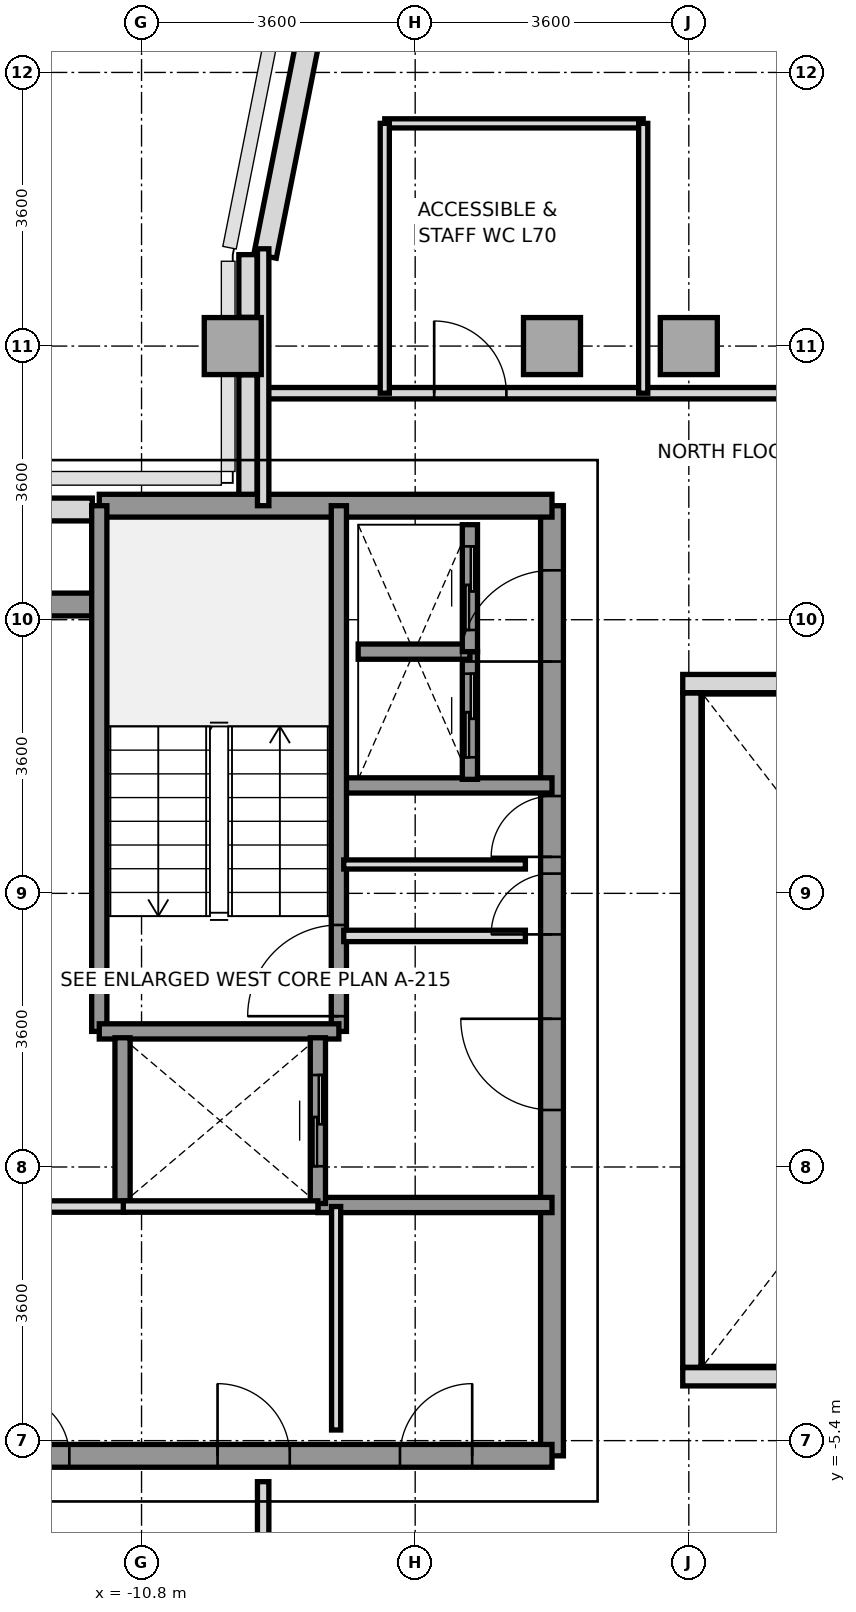
"""IFC4 building model, lengths in metres.
Left out: names, types, materials, properties, quantities, classifications, styles, units other than length and angle.
Written with IfcOpenShell. Run it as: python <this file> out.ifc"""

import sys

from ifc_helpers import new_model, si_unit, direction, frame, frame_2d, origin, origin_2d, place, context, subcontext, project, spatial, rectangle, extrude, source, transform, mapped, element, fill, save


model = new_model("IFC4")
c1 = context("Model", 3, precision=1e-05, world=origin(), true_north=direction((0.0, 1.0)))
c2 = subcontext(c1, "Body", "Model", "MODEL_VIEW")
j1 = project(units=[si_unit("LENGTHUNIT", "METRE"), si_unit("PLANEANGLEUNIT", "RADIAN")], contexts=[c1])
p1 = place(None, origin())
s1 = spatial("IfcSite", under=j1, at=p1, CompositionType="ELEMENT")
p2 = place(p1, origin())
s2 = spatial("IfcBuilding", under=s1, at=p2, CompositionType="ELEMENT")
p3 = place(p2, frame((0.0, 0.0, 252.4)))
s3 = spatial("IfcBuildingStorey", under=s2, at=p3, CompositionType="ELEMENT", Elevation=252.4)
m1 = source(origin(), c2, "Body", "SweptSolid", [
    extrude(rectangle(XDim=0.75, YDim=0.75, at=origin_2d()), origin(), (0.0, 0.0, 1.0), 3.01),
])
for number, where, z_axis, x_axis in (
    (1, (-9.6, 9.0, 0.0), (0.0, 0.0, 1.0), (1.0, 0.0, 0.0)),
    (2, (-5.4, 9.0, 0.0), (0.0, 0.0, 1.0), (1.0, 0.0, 0.0)),
    (3, (-3.6, 9.0, 0.0), (0.0, 0.0, 1.0), (1.0, 0.0, 0.0)),
):
    element("IfcColumn", number, at=place(p3, frame(where, z_axis=z_axis, x_axis=x_axis)), inside=s3, PredefinedType="COLUMN", context=c2, shape_type="MappedRepresentation", body=[
        mapped(m1, transform((0.0, 0.0, 0.0), x_axis=(1.0, 0.0, 0.0), y_axis=(0.0, 1.0, 0.0), z_axis=(0.0, 0.0, 1.0), scale=1.0)),
    ])
p4 = place(p3, frame((-13.6, 6.85, 0.0), z_axis=(0.0, 0.0, 1.0), x_axis=(1.0, 0.0, 0.0)))
e4 = element("IfcWall", 4, at=p4, inside=s3, PredefinedType="SOLIDWALL", context=c2, shape_type="SweptSolid", body=[
    extrude(rectangle(XDim=2.152, YDim=0.3, at=frame_2d((1.076, 0.0))), origin(), (0.0, 0.0, 1.0), 3.01),
])
p5 = place(p3, frame((-8.471, 13.725, 0.0), z_axis=(0.0, 0.0, 1.0), x_axis=(-0.195114232679, -0.980780523974, 0.0)))
e5 = element("IfcWall", 5, at=p5, inside=s3, PredefinedType="SOLIDWALL", context=c2, shape_type="SweptSolid", body=[
    extrude(rectangle(XDim=3.609, YDim=0.3, at=frame_2d((1.804, 0.0))), origin(), (0.0, 0.0, 1.0), 3.01),
])
p6 = place(p3, frame((-9.4, 6.953, 0.0), z_axis=(0.0, 0.0, 1.0), x_axis=(0.0, 1.0, 0.0)))
e6 = element("IfcWall", 6, at=p6, inside=s3, PredefinedType="PARAPET", context=c2, shape_type="SweptSolid", body=[
    extrude(rectangle(XDim=1.669, YDim=0.24, at=frame_2d((0.834, 0.0))), origin(), (0.0, 0.0, 1.0), 1.15),
])
p7 = place(p3, frame((-9.4, 9.378, 0.0), z_axis=(0.0, 0.0, 1.0), x_axis=(0.0, 1.0, 0.0)))
e7 = element("IfcWall", 7, at=p7, inside=s3, PredefinedType="PARAPET", context=c2, shape_type="SweptSolid", body=[
    extrude(rectangle(XDim=0.825, YDim=0.24, at=frame_2d((0.413, 0.0))), origin(), (0.0, 0.0, 1.0), 1.15),
])
p8 = place(p3, frame((-5.4, -5.6, 0.0), z_axis=(0.0, 0.0, 1.0), x_axis=(0.0, 1.0, 0.0)))
e8 = element("IfcWall", 8, at=p8, inside=s3, PredefinedType="SHEAR", context=c2, shape_type="SweptSolid", body=[
    extrude(rectangle(XDim=12.5, YDim=0.3, at=frame_2d((6.25, 0.0))), origin(), (0.0, 0.0, 1.0), 3.01),
])
p9 = place(p8, frame((4.55, 0.0, 0.0)))
e9 = element("IfcOpeningElement", 9, at=p9, cuts=e8, PredefinedType="OPENING", context=c2, shape_type="SweptSolid", body=[
    extrude(rectangle(XDim=1.2, YDim=2.2, at=frame_2d((0.6, 1.1))), frame((0.0, 0.16, 0.0), z_axis=(0.0, -1.0, 0.0), x_axis=(1.0, 0.0, 0.0)), (0.0, 0.0, 1.0), 0.32),
])
p10 = place(p8, frame((10.45, 0.0, 0.0)))
e10 = element("IfcOpeningElement", 10, at=p10, cuts=e8, PredefinedType="OPENING", context=c2, shape_type="SweptSolid", body=[
    extrude(rectangle(XDim=1.2, YDim=2.2, at=frame_2d((0.6, 1.1))), frame((0.0, 0.16, 0.0), z_axis=(0.0, -1.0, 0.0), x_axis=(1.0, 0.0, 0.0)), (0.0, 0.0, 1.0), 0.32),
])
p11 = place(p8, frame((6.86, 0.0, 0.0)))
e11 = element("IfcOpeningElement", 11, at=p11, cuts=e8, PredefinedType="OPENING", context=c2, shape_type="SweptSolid", body=[
    extrude(rectangle(XDim=0.8, YDim=2.1, at=frame_2d((0.4, 1.05))), frame((0.0, 0.16, 0.0), z_axis=(0.0, -1.0, 0.0), x_axis=(1.0, 0.0, 0.0)), (0.0, 0.0, 1.0), 0.32),
])
p12 = place(p8, frame((7.88, 0.0, 0.0)))
e12 = element("IfcOpeningElement", 12, at=p12, cuts=e8, PredefinedType="OPENING", context=c2, shape_type="SweptSolid", body=[
    extrude(rectangle(XDim=0.8, YDim=2.1, at=frame_2d((0.4, 1.05))), frame((0.0, 0.16, 0.0), z_axis=(0.0, -1.0, 0.0), x_axis=(1.0, 0.0, 0.0)), (0.0, 0.0, 1.0), 0.32),
])
p13 = place(p3, frame((-11.356, 6.9, 0.0), z_axis=(0.0, 0.0, 1.0), x_axis=(1.0, 0.0, 0.0)))
e13 = element("IfcWall", 13, at=p13, inside=s3, PredefinedType="SHEAR", context=c2, shape_type="SweptSolid", body=[
    extrude(rectangle(XDim=5.956, YDim=0.3, at=frame_2d((2.978, 0.0))), origin(), (0.0, 0.0, 1.0), 3.01),
])
p14 = place(p3, frame((-13.2, 5.6, 0.0), z_axis=(0.0, 0.0, 1.0), x_axis=(1.0, 0.0, 0.0)))
e14 = element("IfcWall", 14, at=p14, inside=s3, PredefinedType="SHEAR", context=c2, shape_type="SweptSolid", body=[
    extrude(rectangle(XDim=1.844, YDim=0.3, at=frame_2d((0.922, 0.0))), origin(), (0.0, 0.0, 1.0), 3.01),
])
p15 = place(p3, frame((-13.2, -5.6, 0.0), z_axis=(0.0, 0.0, 1.0), x_axis=(1.0, 0.0, 0.0)))
e15 = element("IfcWall", 15, at=p15, inside=s3, PredefinedType="SHEAR", context=c2, shape_type="SweptSolid", body=[
    extrude(rectangle(XDim=7.8, YDim=0.3, at=frame_2d((3.9, 0.0))), origin(), (0.0, 0.0, 1.0), 3.01),
])
p16 = place(p15, frame((0.65, 0.0, 0.0)))
e16 = element("IfcOpeningElement", 16, at=p16, cuts=e15, PredefinedType="OPENING", context=c2, shape_type="SweptSolid", body=[
    extrude(rectangle(XDim=0.8, YDim=2.1, at=frame_2d((0.4, 1.05))), frame((0.0, 0.16, 0.0), z_axis=(0.0, -1.0, 0.0), x_axis=(1.0, 0.0, 0.0)), (0.0, 0.0, 1.0), 0.32),
])
p17 = place(p15, frame((3.4, 0.0, 0.0)))
e17 = element("IfcOpeningElement", 17, at=p17, cuts=e15, PredefinedType="OPENING", context=c2, shape_type="SweptSolid", body=[
    extrude(rectangle(XDim=0.95, YDim=2.15, at=frame_2d((0.475, 1.075))), frame((0.0, 0.16, 0.0), z_axis=(0.0, -1.0, 0.0), x_axis=(1.0, 0.0, 0.0)), (0.0, 0.0, 1.0), 0.32),
])
p18 = place(p15, frame((5.8, 0.0, 0.0)))
e18 = element("IfcOpeningElement", 18, at=p18, cuts=e15, PredefinedType="OPENING", context=c2, shape_type="SweptSolid", body=[
    extrude(rectangle(XDim=0.95, YDim=2.15, at=frame_2d((0.475, 1.075))), frame((0.0, 0.16, 0.0), z_axis=(0.0, -1.0, 0.0), x_axis=(1.0, 0.0, 0.0)), (0.0, 0.0, 1.0), 0.32),
])
p19 = place(p3, frame((-8.18, 3.22, 0.0), z_axis=(0.0, 0.0, 1.0), x_axis=(1.0, 0.0, 0.0)))
e19 = element("IfcWall", 19, at=p19, inside=s3, PredefinedType="SOLIDWALL", context=c2, shape_type="SweptSolid", body=[
    extrude(rectangle(XDim=2.78, YDim=0.2, at=frame_2d((1.39, 0.0))), origin(), (0.0, 0.0, 1.0), 3.01),
])
p20 = place(p3, frame((-8.48, -2.3, 0.0), z_axis=(0.0, 0.0, 1.0), x_axis=(1.0, 0.0, 0.0)))
e20 = element("IfcWall", 20, at=p20, inside=s3, PredefinedType="SOLIDWALL", context=c2, shape_type="SweptSolid", body=[
    extrude(rectangle(XDim=3.08, YDim=0.2, at=frame_2d((1.54, 0.0))), origin(), (0.0, 0.0, 1.0), 3.01),
])
p21 = place(p3, frame((-8.204, -0.016, 0.0), z_axis=(0.0, 0.0, 1.0), x_axis=(0.0, 1.0, 0.0)))
e21 = element("IfcWall", 21, at=p21, inside=s3, PredefinedType="SOLIDWALL", context=c2, shape_type="SweptSolid", body=[
    extrude(rectangle(XDim=6.916, YDim=0.2, at=frame_2d((3.458, 0.0))), origin(), (0.0, 0.0, 1.0), 3.01),
])
p22 = place(p21, frame((0.2, 0.0, 0.0)))
e22 = element("IfcOpeningElement", 22, at=p22, cuts=e21, PredefinedType="OPENING", context=c2, shape_type="SweptSolid", body=[
    extrude(rectangle(XDim=1.2, YDim=2.2, at=frame_2d((0.6, 1.1))), frame((0.0, 0.11, 0.0), z_axis=(0.0, -1.0, 0.0), x_axis=(1.0, 0.0, 0.0)), (0.0, 0.0, 1.0), 0.22),
])
p23 = place(p3, frame((-11.356, -0.016, 0.0), z_axis=(0.0, 0.0, 1.0), x_axis=(0.0, 1.0, 0.0)))
e23 = element("IfcWall", 23, at=p23, inside=s3, PredefinedType="SOLIDWALL", context=c2, shape_type="SweptSolid", body=[
    extrude(rectangle(XDim=6.916, YDim=0.2, at=frame_2d((3.458, 0.0))), origin(), (0.0, 0.0, 1.0), 3.01),
])
p24 = place(p3, frame((-11.356, -0.016, 0.0), z_axis=(0.0, 0.0, 1.0), x_axis=(1.0, 0.0, 0.0)))
e24 = element("IfcWall", 24, at=p24, inside=s3, PredefinedType="SOLIDWALL", context=c2, shape_type="SweptSolid", body=[
    extrude(rectangle(XDim=3.152, YDim=0.2, at=frame_2d((1.576, 0.0))), origin(), (0.0, 0.0, 1.0), 3.01),
])
p25 = place(p3, frame((-11.05, -2.28, 0.0), z_axis=(0.0, 0.0, 1.0), x_axis=(0.0, 1.0, 0.0)))
e25 = element("IfcWall", 25, at=p25, inside=s3, PredefinedType="SOLIDWALL", context=c2, shape_type="SweptSolid", body=[
    extrude(rectangle(XDim=2.18, YDim=0.2, at=frame_2d((1.09, 0.0))), origin(), (0.0, 0.0, 1.0), 3.01),
])
p26 = place(p3, frame((-8.48, -2.28, 0.0), z_axis=(0.0, 0.0, 1.0), x_axis=(0.0, 1.0, 0.0)))
e26 = element("IfcWall", 26, at=p26, inside=s3, PredefinedType="SOLIDWALL", context=c2, shape_type="SweptSolid", body=[
    extrude(rectangle(XDim=2.18, YDim=0.2, at=frame_2d((1.09, 0.0))), origin(), (0.0, 0.0, 1.0), 3.01),
])
p27 = place(p26, frame((0.49, 0.0, 0.0)))
e27 = element("IfcOpeningElement", 27, at=p27, cuts=e26, PredefinedType="OPENING", context=c2, shape_type="SweptSolid", body=[
    extrude(rectangle(XDim=1.2, YDim=2.2, at=frame_2d((0.6, 1.1))), frame((0.0, 0.11, 0.0), z_axis=(0.0, -1.0, 0.0), x_axis=(1.0, 0.0, 0.0)), (0.0, 0.0, 1.0), 0.22),
])
p28 = place(p3, frame((-6.48, 3.3, 0.0), z_axis=(0.0, 0.0, 1.0), x_axis=(0.0, 1.0, 0.0)))
e28 = element("IfcWall", 28, at=p28, inside=s3, PredefinedType="SOLIDWALL", context=c2, shape_type="SweptSolid", body=[
    extrude(rectangle(XDim=1.68, YDim=0.2, at=frame_2d((0.84, 0.0))), origin(), (0.0, 0.0, 1.0), 3.01),
])
p29 = place(p28, frame((0.29, 0.0, 0.0)))
e29 = element("IfcOpeningElement", 29, at=p29, cuts=e28, PredefinedType="OPENING", context=c2, shape_type="SweptSolid", body=[
    extrude(rectangle(XDim=1.1, YDim=2.2, at=frame_2d((0.55, 1.1))), frame((0.0, 0.11, 0.0), z_axis=(0.0, -1.0, 0.0), x_axis=(1.0, 0.0, 0.0)), (0.0, 0.0, 1.0), 0.22),
])
p30 = place(p3, frame((-7.95, 4.98, 0.0), z_axis=(0.0, 0.0, 1.0), x_axis=(1.0, 0.0, 0.0)))
e30 = element("IfcWall", 30, at=p30, inside=s3, PredefinedType="SOLIDWALL", context=c2, shape_type="SweptSolid", body=[
    extrude(rectangle(XDim=1.47, YDim=0.2, at=frame_2d((0.735, 0.0))), origin(), (0.0, 0.0, 1.0), 3.01),
])
p31 = place(p3, frame((-6.48, 4.98, 0.0), z_axis=(0.0, 0.0, 1.0), x_axis=(0.0, 1.0, 0.0)))
e31 = element("IfcWall", 31, at=p31, inside=s3, PredefinedType="SOLIDWALL", context=c2, shape_type="SweptSolid", body=[
    extrude(rectangle(XDim=1.67, YDim=0.2, at=frame_2d((0.835, 0.0))), origin(), (0.0, 0.0, 1.0), 3.01),
])
p32 = place(p31, frame((0.285, 0.0, 0.0)))
e32 = element("IfcOpeningElement", 32, at=p32, cuts=e31, PredefinedType="OPENING", context=c2, shape_type="SweptSolid", body=[
    extrude(rectangle(XDim=1.1, YDim=2.2, at=frame_2d((0.55, 1.1))), frame((0.0, 0.11, 0.0), z_axis=(0.0, -1.0, 0.0), x_axis=(1.0, 0.0, 0.0)), (0.0, 0.0, 1.0), 0.22),
])
p33 = place(p3, frame((-8.14, 1.24, 0.0), z_axis=(0.0, 0.0, 1.0), x_axis=(1.0, 0.0, 0.0)))
e33 = element("IfcWall", 33, at=p33, inside=s3, PredefinedType="PARTITIONING", context=c2, shape_type="SweptSolid", body=[
    extrude(rectangle(XDim=2.39, YDim=0.15, at=frame_2d((1.195, 0.0))), origin(), (0.0, 0.0, 1.0), 3.01),
])
p34 = place(p3, frame((-8.14, 2.18, 0.0), z_axis=(0.0, 0.0, 1.0), x_axis=(1.0, 0.0, 0.0)))
e34 = element("IfcWall", 34, at=p34, inside=s3, PredefinedType="PARTITIONING", context=c2, shape_type="SweptSolid", body=[
    extrude(rectangle(XDim=2.39, YDim=0.12, at=frame_2d((1.195, 0.0))), origin(), (0.0, 0.0, 1.0), 3.01),
])
p35 = place(p3, frame((-13.2, -2.32, 0.0), z_axis=(0.0, 0.0, 1.0), x_axis=(1.0, 0.0, 0.0)))
e35 = element("IfcWall", 35, at=p35, inside=s3, PredefinedType="PARTITIONING", context=c2, shape_type="SweptSolid", body=[
    extrude(rectangle(XDim=2.18, YDim=0.15, at=frame_2d((1.09, 0.0))), origin(), (0.0, 0.0, 1.0), 3.01),
])
p36 = place(p3, frame((-8.24, -5.26, 0.0), z_axis=(0.0, 0.0, 1.0), x_axis=(0.0, 1.0, 0.0)))
e36 = element("IfcWall", 36, at=p36, inside=s3, PredefinedType="PARTITIONING", context=c2, shape_type="SweptSolid", body=[
    extrude(rectangle(XDim=2.94, YDim=0.12, at=frame_2d((1.47, 0.0))), origin(), (0.0, 0.0, 1.0), 3.01),
])
p37 = place(p3, frame((-11.04, -2.32, 0.0), z_axis=(0.0, 0.0, 1.0), x_axis=(1.0, 0.0, 0.0)))
e37 = element("IfcWall", 37, at=p37, inside=s3, PredefinedType="PARTITIONING", context=c2, shape_type="SweptSolid", body=[
    extrude(rectangle(XDim=2.56, YDim=0.15, at=frame_2d((1.28, 0.0))), origin(), (0.0, 0.0, 1.0), 3.01),
])
p38 = place(p3, frame((-9.2, 8.38, 0.0), z_axis=(0.0, 0.0, 1.0), x_axis=(1.0, 0.0, 0.0)))
e38 = element("IfcWall", 38, at=p38, inside=s3, PredefinedType="PARTITIONING", context=c2, shape_type="SweptSolid", body=[
    extrude(rectangle(XDim=18.4, YDim=0.15, at=frame_2d((9.2, 0.0))), origin(), (0.0, 0.0, 1.0), 2.57),
])
p39 = place(p38, frame((2.25, 0.0, 0.0)))
e39 = element("IfcOpeningElement", 39, at=p39, cuts=e38, PredefinedType="OPENING", context=c2, shape_type="SweptSolid", body=[
    extrude(rectangle(XDim=0.95, YDim=2.15, at=frame_2d((0.475, 1.075))), frame((0.0, 0.085, 0.0), z_axis=(0.0, -1.0, 0.0), x_axis=(1.0, 0.0, 0.0)), (0.0, 0.0, 1.0), 0.17),
])
p40 = place(p38, frame((15.15, 0.0, 0.0)))
e40 = element("IfcOpeningElement", 40, at=p40, cuts=e38, PredefinedType="OPENING", context=c2, shape_type="SweptSolid", body=[
    extrude(rectangle(XDim=1.1, YDim=2.2, at=frame_2d((0.55, 1.1))), frame((0.0, 0.085, 0.0), z_axis=(0.0, -1.0, 0.0), x_axis=(1.0, 0.0, 0.0)), (0.0, 0.0, 1.0), 0.17),
])
p41 = place(p3, frame((-9.2, 6.9, 0.0), z_axis=(0.0, 0.0, 1.0), x_axis=(0.0, 1.0, 0.0)))
e41 = element("IfcWall", 41, at=p41, inside=s3, PredefinedType="PARTITIONING", context=c2, shape_type="SweptSolid", body=[
    extrude(rectangle(XDim=3.38, YDim=0.15, at=frame_2d((1.69, 0.0))), origin(), (0.0, 0.0, 1.0), 2.61),
])
p42 = place(p3, frame((-7.6, 11.93, 0.0), z_axis=(0.0, 0.0, 1.0), x_axis=(1.0, 0.0, 0.0)))
e42 = element("IfcWall", 42, at=p42, inside=s3, PredefinedType="PARTITIONING", context=c2, shape_type="SweptSolid", body=[
    extrude(rectangle(XDim=3.4, YDim=0.12, at=frame_2d((1.7, 0.0))), origin(), (0.0, 0.0, 1.0), 3.01),
])
for number, where, z_axis, x_axis in (
    (43, (-7.6, 8.38, 0.0), (0.0, 0.0, 1.0), (0.0, 1.0, 0.0)),
    (44, (-4.2, 8.38, 0.0), (0.0, 0.0, 1.0), (0.0, 1.0, 0.0)),
):
    element("IfcWall", number, at=place(p3, frame(where, z_axis=z_axis, x_axis=x_axis)), inside=s3, PredefinedType="PARTITIONING", context=c2, shape_type="SweptSolid", body=[
        extrude(rectangle(XDim=3.55, YDim=0.12, at=frame_2d((1.775, 0.0))), origin(), (0.0, 0.0, 1.0), 2.61),
    ])
p43 = place(p3, frame((-9.2, -10.28, 0.0), z_axis=(0.0, 0.0, 1.0), x_axis=(0.0, 1.0, 0.0)))
e45 = element("IfcWall", 45, at=p43, inside=s3, PredefinedType="PARTITIONING", context=c2, shape_type="SweptSolid", body=[
    extrude(rectangle(XDim=4.34, YDim=0.15, at=frame_2d((2.17, 0.0))), origin(), (0.0, 0.0, 1.0), 2.61),
])
for number, where, z_axis, x_axis in (
    (46, (-3.68, -4.56, 0.0), (0.0, 0.0, 1.0), (1.0, 0.0, 0.0)),
    (47, (-3.68, 4.56, 0.0), (0.0, 0.0, 1.0), (1.0, 0.0, 0.0)),
):
    element("IfcWall", number, at=place(p3, frame(where, z_axis=z_axis, x_axis=x_axis)), inside=s3, PredefinedType="PARAPET", context=c2, shape_type="SweptSolid", body=[
        extrude(rectangle(XDim=7.36, YDim=0.24, at=frame_2d((3.68, 0.0))), origin(), (0.0, 0.0, 1.0), 1.15),
    ])
p44 = place(p3, frame((-3.56, -4.435, 0.0), z_axis=(0.0, 0.0, 1.0), x_axis=(0.0, 1.0, 0.0)))
e48 = element("IfcWall", 48, at=p44, inside=s3, PredefinedType="PARAPET", context=c2, shape_type="SweptSolid", body=[
    extrude(rectangle(XDim=8.87, YDim=0.24, at=frame_2d((4.435, 0.0))), origin(), (0.0, 0.0, 1.0), 1.15),
])
m2 = source(origin(), c2, "Body", "SweptSolid", [
    extrude(rectangle(XDim=1.2, YDim=2.2, at=frame_2d((0.6, 1.1))), frame((0.0, 0.025, 0.0), z_axis=(0.0, -1.0, 0.0), x_axis=(1.0, 0.0, 0.0)), (0.0, 0.0, 1.0), 0.05),
])
p45 = place(p22, origin())
e49 = element("IfcDoor", 49, at=p45, inside=s3, OperationType="SINGLE_SWING_LEFT", PredefinedType="DOOR", context=c2, shape_type="MappedRepresentation", body=[
    mapped(m2, transform((0.0, 0.0, 0.0), x_axis=(1.0, 0.0, 0.0), y_axis=(0.0, 1.0, 0.0), z_axis=(0.0, 0.0, 1.0), scale=1.0)),
])
fill(e22, e49)
p46 = place(p9, origin())
e50 = element("IfcDoor", 50, at=p46, inside=s3, OperationType="SINGLE_SWING_RIGHT", PredefinedType="DOOR", context=c2, shape_type="MappedRepresentation", body=[
    mapped(m2, transform((0.0, 0.0, 0.0), x_axis=(1.0, 0.0, 0.0), y_axis=(0.0, 1.0, 0.0), z_axis=(0.0, 0.0, 1.0), scale=1.0)),
])
fill(e9, e50)
p47 = place(p10, origin())
e51 = element("IfcDoor", 51, at=p47, inside=s3, OperationType="SINGLE_SWING_LEFT", PredefinedType="DOOR", context=c2, shape_type="MappedRepresentation", body=[
    mapped(m2, transform((0.0, 0.0, 0.0), x_axis=(1.0, 0.0, 0.0), y_axis=(0.0, 1.0, 0.0), z_axis=(0.0, 0.0, 1.0), scale=1.0)),
])
fill(e10, e51)
m3 = source(origin(), c2, "Body", "SweptSolid", [
    extrude(rectangle(XDim=0.8, YDim=2.1, at=frame_2d((0.4, 1.05))), frame((0.0, 0.025, 0.0), z_axis=(0.0, -1.0, 0.0), x_axis=(1.0, 0.0, 0.0)), (0.0, 0.0, 1.0), 0.05),
])
p48 = place(p11, origin())
e52 = element("IfcDoor", 52, at=p48, inside=s3, OperationType="SINGLE_SWING_LEFT", PredefinedType="DOOR", context=c2, shape_type="MappedRepresentation", body=[
    mapped(m3, transform((0.0, 0.0, 0.0), x_axis=(1.0, 0.0, 0.0), y_axis=(0.0, 1.0, 0.0), z_axis=(0.0, 0.0, 1.0), scale=1.0)),
])
fill(e11, e52)
p49 = place(p12, origin())
e53 = element("IfcDoor", 53, at=p49, inside=s3, OperationType="SINGLE_SWING_LEFT", PredefinedType="DOOR", context=c2, shape_type="MappedRepresentation", body=[
    mapped(m3, transform((0.0, 0.0, 0.0), x_axis=(1.0, 0.0, 0.0), y_axis=(0.0, 1.0, 0.0), z_axis=(0.0, 0.0, 1.0), scale=1.0)),
])
fill(e12, e53)
p50 = place(p16, origin())
e54 = element("IfcDoor", 54, at=p50, inside=s3, OperationType="SINGLE_SWING_LEFT", PredefinedType="DOOR", context=c2, shape_type="MappedRepresentation", body=[
    mapped(m3, transform((0.0, 0.0, 0.0), x_axis=(1.0, 0.0, 0.0), y_axis=(0.0, 1.0, 0.0), z_axis=(0.0, 0.0, 1.0), scale=1.0)),
])
fill(e16, e54)
m4 = source(origin(), c2, "Body", "SweptSolid", [
    extrude(rectangle(XDim=0.95, YDim=2.15, at=frame_2d((0.475, 1.075))), frame((0.0, 0.025, 0.0), z_axis=(0.0, -1.0, 0.0), x_axis=(1.0, 0.0, 0.0)), (0.0, 0.0, 1.0), 0.05),
])
p51 = place(p17, origin())
e55 = element("IfcDoor", 55, at=p51, inside=s3, OperationType="SINGLE_SWING_LEFT", PredefinedType="DOOR", context=c2, shape_type="MappedRepresentation", body=[
    mapped(m4, transform((0.0, 0.0, 0.0), x_axis=(1.0, 0.0, 0.0), y_axis=(0.0, 1.0, 0.0), z_axis=(0.0, 0.0, 1.0), scale=1.0)),
])
fill(e17, e55)
p52 = place(p18, origin())
e56 = element("IfcDoor", 56, at=p52, inside=s3, OperationType="SINGLE_SWING_RIGHT", PredefinedType="DOOR", context=c2, shape_type="MappedRepresentation", body=[
    mapped(m4, transform((0.0, 0.0, 0.0), x_axis=(1.0, 0.0, 0.0), y_axis=(0.0, 1.0, 0.0), z_axis=(0.0, 0.0, 1.0), scale=1.0)),
])
fill(e18, e56)
p53 = place(p27, origin())
e57 = element("IfcDoor", 57, at=p53, inside=s3, OperationType="SLIDING_TO_RIGHT", PredefinedType="DOOR", context=c2, shape_type="MappedRepresentation", body=[
    mapped(m2, transform((0.0, 0.0, 0.0), x_axis=(1.0, 0.0, 0.0), y_axis=(0.0, 1.0, 0.0), z_axis=(0.0, 0.0, 1.0), scale=1.0)),
])
fill(e27, e57)
m5 = source(origin(), c2, "Body", "SweptSolid", [
    extrude(rectangle(XDim=1.1, YDim=2.2, at=frame_2d((0.55, 1.1))), frame((0.0, 0.025, 0.0), z_axis=(0.0, -1.0, 0.0), x_axis=(1.0, 0.0, 0.0)), (0.0, 0.0, 1.0), 0.05),
])
p54 = place(p29, origin())
e58 = element("IfcDoor", 58, at=p54, inside=s3, OperationType="SLIDING_TO_LEFT", PredefinedType="DOOR", context=c2, shape_type="MappedRepresentation", body=[
    mapped(m5, transform((0.0, 0.0, 0.0), x_axis=(1.0, 0.0, 0.0), y_axis=(0.0, 1.0, 0.0), z_axis=(0.0, 0.0, 1.0), scale=1.0)),
])
fill(e29, e58)
p55 = place(p32, origin())
e59 = element("IfcDoor", 59, at=p55, inside=s3, OperationType="SLIDING_TO_LEFT", PredefinedType="DOOR", context=c2, shape_type="MappedRepresentation", body=[
    mapped(m5, transform((0.0, 0.0, 0.0), x_axis=(1.0, 0.0, 0.0), y_axis=(0.0, 1.0, 0.0), z_axis=(0.0, 0.0, 1.0), scale=1.0)),
])
fill(e32, e59)
p56 = place(p39, origin())
e60 = element("IfcDoor", 60, at=p56, inside=s3, OperationType="SINGLE_SWING_LEFT", PredefinedType="DOOR", context=c2, shape_type="MappedRepresentation", body=[
    mapped(m4, transform((0.0, 0.0, 0.0), x_axis=(1.0, 0.0, 0.0), y_axis=(0.0, 1.0, 0.0), z_axis=(0.0, 0.0, 1.0), scale=1.0)),
])
fill(e39, e60)
save(model, sys.argv[1])
